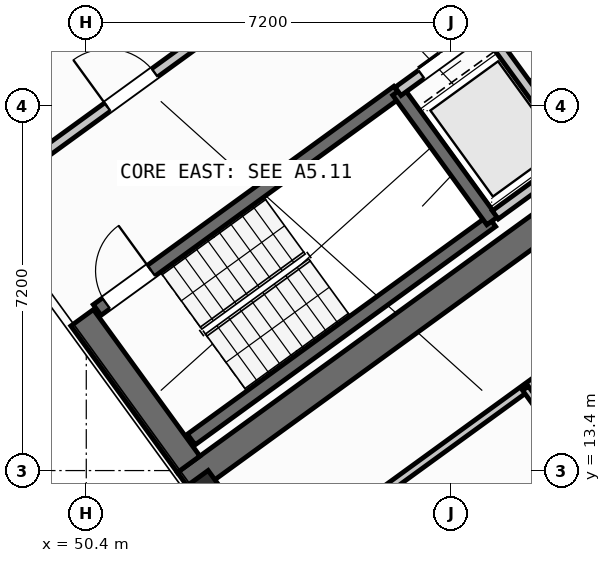
"""IFC4 building model, lengths in metres.
Left out: names, types, materials, properties, quantities, classifications, styles, units other than length and angle.
Written with IfcOpenShell. Run it as: python <this file> out.ifc"""

import sys

from ifc_helpers import new_model, si_unit, direction, frame, frame_2d, origin, origin_2d, place, context, subcontext, project, spatial, rectangle, hollow_rectangle, extrude, source, transform, mapped, element, fill, save


model = new_model("IFC4")
c1 = context("Model", 3, precision=1e-05, world=origin(), true_north=direction((0.0, 1.0)))
c2 = subcontext(c1, "Body", "Model", "MODEL_VIEW")
j1 = project(units=[si_unit("LENGTHUNIT", "METRE"), si_unit("PLANEANGLEUNIT", "RADIAN")], contexts=[c1])
p1 = place(None, origin())
s1 = spatial("IfcSite", under=j1, at=p1, CompositionType="ELEMENT")
p2 = place(p1, origin())
s2 = spatial("IfcBuilding", under=s1, at=p2, CompositionType="ELEMENT")
p3 = place(p2, frame((0.0, 0.0, 147.9)))
s3 = spatial("IfcBuildingStorey", under=s2, at=p3, CompositionType="ELEMENT", Elevation=147.9)
p4 = place(p3, frame((52.359, 13.14, 0.0), z_axis=(0.0, 0.0, 1.0), x_axis=(0.809014896919, 0.587788139183, 0.0)))
e1 = element("IfcWall", 1, at=p4, inside=s3, PredefinedType="SHEAR", context=c2, shape_type="SweptSolid", body=[
    extrude(rectangle(XDim=12.34, YDim=0.55, at=frame_2d((6.17, 0.0))), origin(), (0.0, 0.0, 1.0), 3.35),
])
p5 = place(p3, frame((52.42, 13.524, 0.0), z_axis=(0.0, 0.0, 1.0), x_axis=(-0.587802113096, 0.809004744015, 0.0)))
e2 = element("IfcWall", 2, at=p5, inside=s3, PredefinedType="SHEAR", context=c2, shape_type="SweptSolid", body=[
    extrude(rectangle(XDim=3.575, YDim=0.55, at=frame_2d((1.788, 0.0))), origin(), (0.0, 0.0, 1.0), 3.35),
])
m1 = source(origin(), c2, "Body", "SweptSolid", [
    extrude(hollow_rectangle(XDim=0.9, YDim=0.9, WallThickness=0.036, at=origin_2d()), origin(), (0.0, 0.0, 1.0), 3.6),
])
p6 = place(p3, frame((52.705, 12.773, 0.0), z_axis=(0.0, 0.0, 1.0), x_axis=(0.809016994375, 0.587785252292, 0.0)))
e3 = element("IfcColumn", 3, at=p6, inside=s3, PredefinedType="COLUMN", context=c2, shape_type="MappedRepresentation", body=[
    mapped(m1, transform((0.0, 0.0, 0.0), scale=1.0)),
])
p7 = place(p3, frame((58.455, 35.484, 0.0), z_axis=(0.0, 0.0, 1.0), x_axis=(0.587783625747, -0.809018176127, 0.0)))
e4 = element("IfcWall", 4, at=p7, inside=s3, PredefinedType="STANDARD", context=c2, shape_type="SweptSolid", body=[
    extrude(rectangle(XDim=21.587, YDim=0.32, at=frame_2d((10.794, 0.0))), origin(), (0.0, 0.0, 1.0), 2.775),
])
p8 = place(p7, frame((2.994, 0.0, 0.8)))
e5 = element("IfcOpeningElement", 5, at=p8, cuts=e4, PredefinedType="OPENING", context=c2, shape_type="SweptSolid", body=[
    extrude(rectangle(XDim=2.1, YDim=1.55, at=frame_2d((1.05, 0.775))), frame((0.0, 0.17, 0.0), z_axis=(0.0, -1.0, 0.0), x_axis=(1.0, 0.0, 0.0)), (0.0, 0.0, 1.0), 0.34),
])
p9 = place(p7, frame((11.959, 0.0, 0.85)))
e6 = element("IfcOpeningElement", 6, at=p9, cuts=e4, PredefinedType="OPENING", context=c2, shape_type="SweptSolid", body=[
    extrude(rectangle(XDim=1.8, YDim=1.5, at=frame_2d((0.9, 0.75))), frame((0.0, 0.17, 0.0), z_axis=(0.0, -1.0, 0.0), x_axis=(1.0, 0.0, 0.0)), (0.0, 0.0, 1.0), 0.34),
])
p10 = place(p7, frame((18.56, 0.0, 0.85)))
e7 = element("IfcOpeningElement", 7, at=p10, cuts=e4, PredefinedType="OPENING", context=c2, shape_type="SweptSolid", body=[
    extrude(rectangle(XDim=1.5, YDim=1.5, at=frame_2d((0.75, 0.75))), frame((0.0, 0.17, 0.0), z_axis=(0.0, -1.0, 0.0), x_axis=(1.0, 0.0, 0.0)), (0.0, 0.0, 1.0), 0.34),
])
p11 = place(p3, frame((71.098, 17.731, 0.0), z_axis=(0.0, 0.0, 1.0), x_axis=(-0.809021120468, -0.587779573171, 0.0)))
e8 = element("IfcWall", 8, at=p11, inside=s3, PredefinedType="STANDARD", context=c2, shape_type="SweptSolid", body=[
    extrude(rectangle(XDim=17.588, YDim=0.32, at=frame_2d((8.794, 0.0))), origin(), (0.0, 0.0, 1.0), 3.35),
])
p12 = place(p11, frame((1.624, 0.0, 0.0)))
e9 = element("IfcOpeningElement", 9, at=p12, cuts=e8, PredefinedType="OPENING", context=c2, shape_type="SweptSolid", body=[
    extrude(rectangle(XDim=1.05, YDim=2.15, at=frame_2d((0.525, 1.075))), frame((0.0, 0.17, 0.0), z_axis=(0.0, -1.0, 0.0), x_axis=(1.0, 0.0, 0.0)), (0.0, 0.0, 1.0), 0.34),
])
p13 = place(p11, frame((4.104, 0.0, 1.0)))
e10 = element("IfcOpeningElement", 10, at=p13, cuts=e8, PredefinedType="OPENING", context=c2, shape_type="SweptSolid", body=[
    extrude(rectangle(XDim=0.9, YDim=1.25, at=frame_2d((0.45, 0.625))), frame((0.0, 0.17, 0.0), z_axis=(0.0, -1.0, 0.0), x_axis=(1.0, 0.0, 0.0)), (0.0, 0.0, 1.0), 0.34),
])
p14 = place(p11, frame((7.879, 0.0, 0.85)))
e11 = element("IfcOpeningElement", 11, at=p14, cuts=e8, PredefinedType="OPENING", context=c2, shape_type="SweptSolid", body=[
    extrude(rectangle(XDim=1.8, YDim=1.5, at=frame_2d((0.9, 0.75))), frame((0.0, 0.17, 0.0), z_axis=(0.0, -1.0, 0.0), x_axis=(1.0, 0.0, 0.0)), (0.0, 0.0, 1.0), 0.34),
])
p15 = place(p11, frame((12.849, 0.0, 0.85)))
e12 = element("IfcOpeningElement", 12, at=p15, cuts=e8, PredefinedType="OPENING", context=c2, shape_type="SweptSolid", body=[
    extrude(rectangle(XDim=1.8, YDim=1.5, at=frame_2d((0.9, 0.75))), frame((0.0, 0.17, 0.0), z_axis=(0.0, -1.0, 0.0), x_axis=(1.0, 0.0, 0.0)), (0.0, 0.0, 1.0), 0.34),
])
p16 = place(p3, frame((52.472, 14.013, 0.0), z_axis=(0.0, 0.0, 1.0), x_axis=(0.809028366311, 0.587769599847, 0.0)))
e13 = element("IfcWall", 13, at=p16, inside=s3, PredefinedType="SHEAR", context=c2, shape_type="SweptSolid", body=[
    extrude(rectangle(XDim=7.33, YDim=0.26, at=frame_2d((3.665, 0.0))), origin(), (0.0, 0.0, 1.0), 3.35),
])
p17 = place(p3, frame((50.615, 16.57, 0.0), z_axis=(0.0, 0.0, 1.0), x_axis=(0.809028366311, 0.587769599847, 0.0)))
e14 = element("IfcWall", 14, at=p17, inside=s3, PredefinedType="SHEAR", context=c2, shape_type="SweptSolid", body=[
    extrude(rectangle(XDim=7.33, YDim=0.26, at=frame_2d((3.665, 0.0))), origin(), (0.0, 0.0, 1.0), 3.35),
])
p18 = place(p17, frame((0.22, 0.0, 0.0)))
e15 = element("IfcOpeningElement", 15, at=p18, cuts=e14, PredefinedType="OPENING", context=c2, shape_type="SweptSolid", body=[
    extrude(rectangle(XDim=1.1, YDim=2.1, at=frame_2d((0.55, 1.05))), frame((0.0, 0.14, 0.0), z_axis=(0.0, -1.0, 0.0), x_axis=(1.0, 0.0, 0.0)), (0.0, 0.0, 1.0), 0.28),
])
p19 = place(p3, frame((58.41, 18.327, 0.0), z_axis=(0.0, 0.0, 1.0), x_axis=(-0.58776738483, 0.809029975545, 0.0)))
e16 = element("IfcWall", 16, at=p19, inside=s3, PredefinedType="SHEAR", context=c2, shape_type="SweptSolid", body=[
    extrude(rectangle(XDim=3.16, YDim=0.26, at=frame_2d((1.58, 0.0))), origin(), (0.0, 0.0, 1.0), 3.35),
])
p20 = place(p3, frame((47.065, 21.407, 0.0), z_axis=(0.0, 0.0, 1.0), x_axis=(0.809032984992, 0.587763242466, 0.0)))
e17 = element("IfcWall", 17, at=p20, inside=s3, PredefinedType="STANDARD", context=c2, shape_type="SweptSolid", body=[
    extrude(rectangle(XDim=3.448, YDim=0.2, at=frame_2d((1.724, 0.0))), origin(), (0.0, 0.0, 1.0), 3.34),
])
p21 = place(p20, frame((0.458, 0.0, 0.0)))
e18 = element("IfcOpeningElement", 18, at=p21, cuts=e17, PredefinedType="OPENING", context=c2, shape_type="SweptSolid", body=[
    extrude(rectangle(XDim=1.3, YDim=2.2, at=frame_2d((0.65, 1.1))), frame((0.0, 0.11, 0.0), z_axis=(0.0, -1.0, 0.0), x_axis=(1.0, 0.0, 0.0)), (0.0, 0.0, 1.0), 0.22),
])
p22 = place(p3, frame((48.758, 19.077, 0.0), z_axis=(0.0, 0.0, 1.0), x_axis=(0.809005065155, 0.587801671104, 0.0)))
e19 = element("IfcWall", 19, at=p22, inside=s3, PredefinedType="STANDARD", context=c2, shape_type="SweptSolid", body=[
    extrude(rectangle(XDim=5.768, YDim=0.2, at=frame_2d((2.884, 0.0))), origin(), (0.0, 0.0, 1.0), 3.34),
])
p23 = place(p22, frame((2.548, 0.0, 0.0)))
e20 = element("IfcOpeningElement", 20, at=p23, cuts=e19, PredefinedType="OPENING", context=c2, shape_type="SweptSolid", body=[
    extrude(rectangle(XDim=1.15, YDim=2.1, at=frame_2d((0.575, 1.05))), frame((0.0, 0.11, 0.0), z_axis=(0.0, -1.0, 0.0), x_axis=(1.0, 0.0, 0.0)), (0.0, 0.0, 1.0), 0.22),
])
p24 = place(p3, frame((56.553, 20.884, 0.0), z_axis=(0.0, 0.0, 1.0), x_axis=(0.809023564264, 0.58777620951, 0.0)))
e21 = element("IfcWall", 21, at=p24, inside=s3, PredefinedType="STANDARD", context=c2, shape_type="SweptSolid", body=[
    extrude(rectangle(XDim=3.818, YDim=0.2, at=frame_2d((1.909, 0.0))), origin(), (0.0, 0.0, 1.0), 3.34),
])
p25 = place(p24, frame((0.57, 0.0, 0.0)))
e22 = element("IfcOpeningElement", 22, at=p25, cuts=e21, PredefinedType="OPENING", context=c2, shape_type="SweptSolid", body=[
    extrude(rectangle(XDim=1.1, YDim=2.15, at=frame_2d((0.55, 1.075))), frame((0.0, 0.11, 0.0), z_axis=(0.0, -1.0, 0.0), x_axis=(1.0, 0.0, 0.0)), (0.0, 0.0, 1.0), 0.22),
])
p26 = place(p24, frame((2.65, 0.0, 0.0)))
e23 = element("IfcOpeningElement", 23, at=p26, cuts=e21, PredefinedType="OPENING", context=c2, shape_type="SweptSolid", body=[
    extrude(rectangle(XDim=0.86, YDim=2.05, at=frame_2d((0.43, 1.025))), frame((0.0, 0.11, 0.0), z_axis=(0.0, -1.0, 0.0), x_axis=(1.0, 0.0, 0.0)), (0.0, 0.0, 1.0), 0.22),
])
p27 = place(p3, frame((60.067, 19.655, 0.0), z_axis=(0.0, 0.0, 1.0), x_axis=(-0.587800520745, 0.809005900975, 0.0)))
e24 = element("IfcWall", 24, at=p27, inside=s3, PredefinedType="STANDARD", context=c2, shape_type="SweptSolid", body=[
    extrude(rectangle(XDim=2.66, YDim=0.2, at=frame_2d((1.33, 0.0))), origin(), (0.0, 0.0, 1.0), 3.34),
])
p28 = place(p3, frame((58.472, 18.447, 0.0), z_axis=(0.0, 0.0, 1.0), x_axis=(0.809018631237, 0.587782999339, 0.0)))
e25 = element("IfcWall", 25, at=p28, inside=s3, PredefinedType="STANDARD", context=c2, shape_type="SweptSolid", body=[
    extrude(rectangle(XDim=3.698, YDim=0.2, at=frame_2d((1.849, 0.0))), origin(), (0.0, 0.0, 1.0), 3.34),
])
p29 = place(p3, frame((53.705, 11.126, 0.0), z_axis=(0.0, 0.0, 1.0), x_axis=(0.809014504436, 0.587788679384, 0.0)))
e26 = element("IfcWall", 26, at=p29, inside=s3, PredefinedType="PARTITIONING", context=c2, shape_type="SweptSolid", body=[
    extrude(rectangle(XDim=14.67, YDim=0.16, at=frame_2d((7.335, 0.0))), origin(), (0.0, 0.0, 1.0), 3.34),
])
p30 = place(p29, frame((10.2, 0.0, 0.0)))
e27 = element("IfcOpeningElement", 27, at=p30, cuts=e26, PredefinedType="OPENING", context=c2, shape_type="SweptSolid", body=[
    extrude(rectangle(XDim=1.0, YDim=2.1, at=frame_2d((0.5, 1.05))), frame((0.0, 0.09, 0.0), z_axis=(0.0, -1.0, 0.0), x_axis=(1.0, 0.0, 0.0)), (0.0, 0.0, 1.0), 0.18),
])
p31 = place(p3, frame((56.249, 9.785, 0.0), z_axis=(0.0, 0.0, 1.0), x_axis=(0.809011747655, 0.587792473715, 0.0)))
e28 = element("IfcWall", 28, at=p31, inside=s3, PredefinedType="PLUMBINGWALL", context=c2, shape_type="SweptSolid", body=[
    extrude(rectangle(XDim=13.4, YDim=0.14, at=frame_2d((6.7, 0.0))), origin(), (0.0, 0.0, 1.0), 3.34),
])
p32 = place(p31, frame((8.94, 0.0, 0.0)))
e29 = element("IfcOpeningElement", 29, at=p32, cuts=e28, PredefinedType="OPENING", context=c2, shape_type="SweptSolid", body=[
    extrude(rectangle(XDim=0.92, YDim=2.08, at=frame_2d((0.46, 1.04))), frame((0.0, 0.08, 0.0), z_axis=(0.0, -1.0, 0.0), x_axis=(1.0, 0.0, 0.0)), (0.0, 0.0, 1.0), 0.16),
])
p33 = place(p3, frame((60.585, 12.936, 0.0), z_axis=(0.0, 0.0, 1.0), x_axis=(-0.587772116736, 0.809026537752, 0.0)))
e30 = element("IfcWall", 30, at=p33, inside=s3, PredefinedType="PLUMBINGWALL", context=c2, shape_type="SweptSolid", body=[
    extrude(rectangle(XDim=2.58, YDim=0.14, at=frame_2d((1.29, 0.0))), origin(), (0.0, 0.0, 1.0), 3.34),
])
p34 = place(p33, frame((0.9, 0.0, 0.0)))
e31 = element("IfcOpeningElement", 31, at=p34, cuts=e30, PredefinedType="OPENING", context=c2, shape_type="SweptSolid", body=[
    extrude(rectangle(XDim=0.78, YDim=2.05, at=frame_2d((0.39, 1.025))), frame((0.0, 0.08, 0.0), z_axis=(0.0, -1.0, 0.0), x_axis=(1.0, 0.0, 0.0)), (0.0, 0.0, 1.0), 0.16),
])
m2 = source(origin(), c2, "Body", "SweptSolid", [
    extrude(rectangle(XDim=1.1, YDim=2.1, at=frame_2d((0.55, 1.05))), frame((0.0, 0.025, 0.0), z_axis=(0.0, -1.0, 0.0), x_axis=(1.0, 0.0, 0.0)), (0.0, 0.0, 1.0), 0.05),
])
p35 = place(p18, origin())
e32 = element("IfcDoor", 32, at=p35, inside=s3, OperationType="SINGLE_SWING_RIGHT", PredefinedType="DOOR", context=c2, shape_type="MappedRepresentation", body=[
    mapped(m2, transform((0.0, 0.0, 0.0), scale=1.0)),
])
fill(e15, e32)
m3 = source(origin(), c2, "Body", "SweptSolid", [
    extrude(rectangle(XDim=1.15, YDim=2.1, at=frame_2d((0.575, 1.05))), frame((0.0, 0.025, 0.0), z_axis=(0.0, -1.0, 0.0), x_axis=(1.0, 0.0, 0.0)), (0.0, 0.0, 1.0), 0.05),
])
p36 = place(p23, origin())
e33 = element("IfcDoor", 33, at=p36, inside=s3, OperationType="SINGLE_SWING_LEFT", PredefinedType="DOOR", context=c2, shape_type="MappedRepresentation", body=[
    mapped(m3, transform((0.0, 0.0, 0.0), scale=1.0)),
])
fill(e20, e33)
m4 = source(origin(), c2, "Body", "SweptSolid", [
    extrude(rectangle(XDim=1.1, YDim=2.15, at=frame_2d((0.55, 1.075))), frame((0.0, 0.025, 0.0), z_axis=(0.0, -1.0, 0.0), x_axis=(1.0, 0.0, 0.0)), (0.0, 0.0, 1.0), 0.05),
])
p37 = place(p25, origin())
e34 = element("IfcDoor", 34, at=p37, inside=s3, OperationType="DOUBLE_DOOR_SLIDING", PredefinedType="DOOR", context=c2, shape_type="MappedRepresentation", body=[
    mapped(m4, transform((0.0, 0.0, 0.0), scale=1.0)),
])
fill(e22, e34)
save(model, sys.argv[1])
